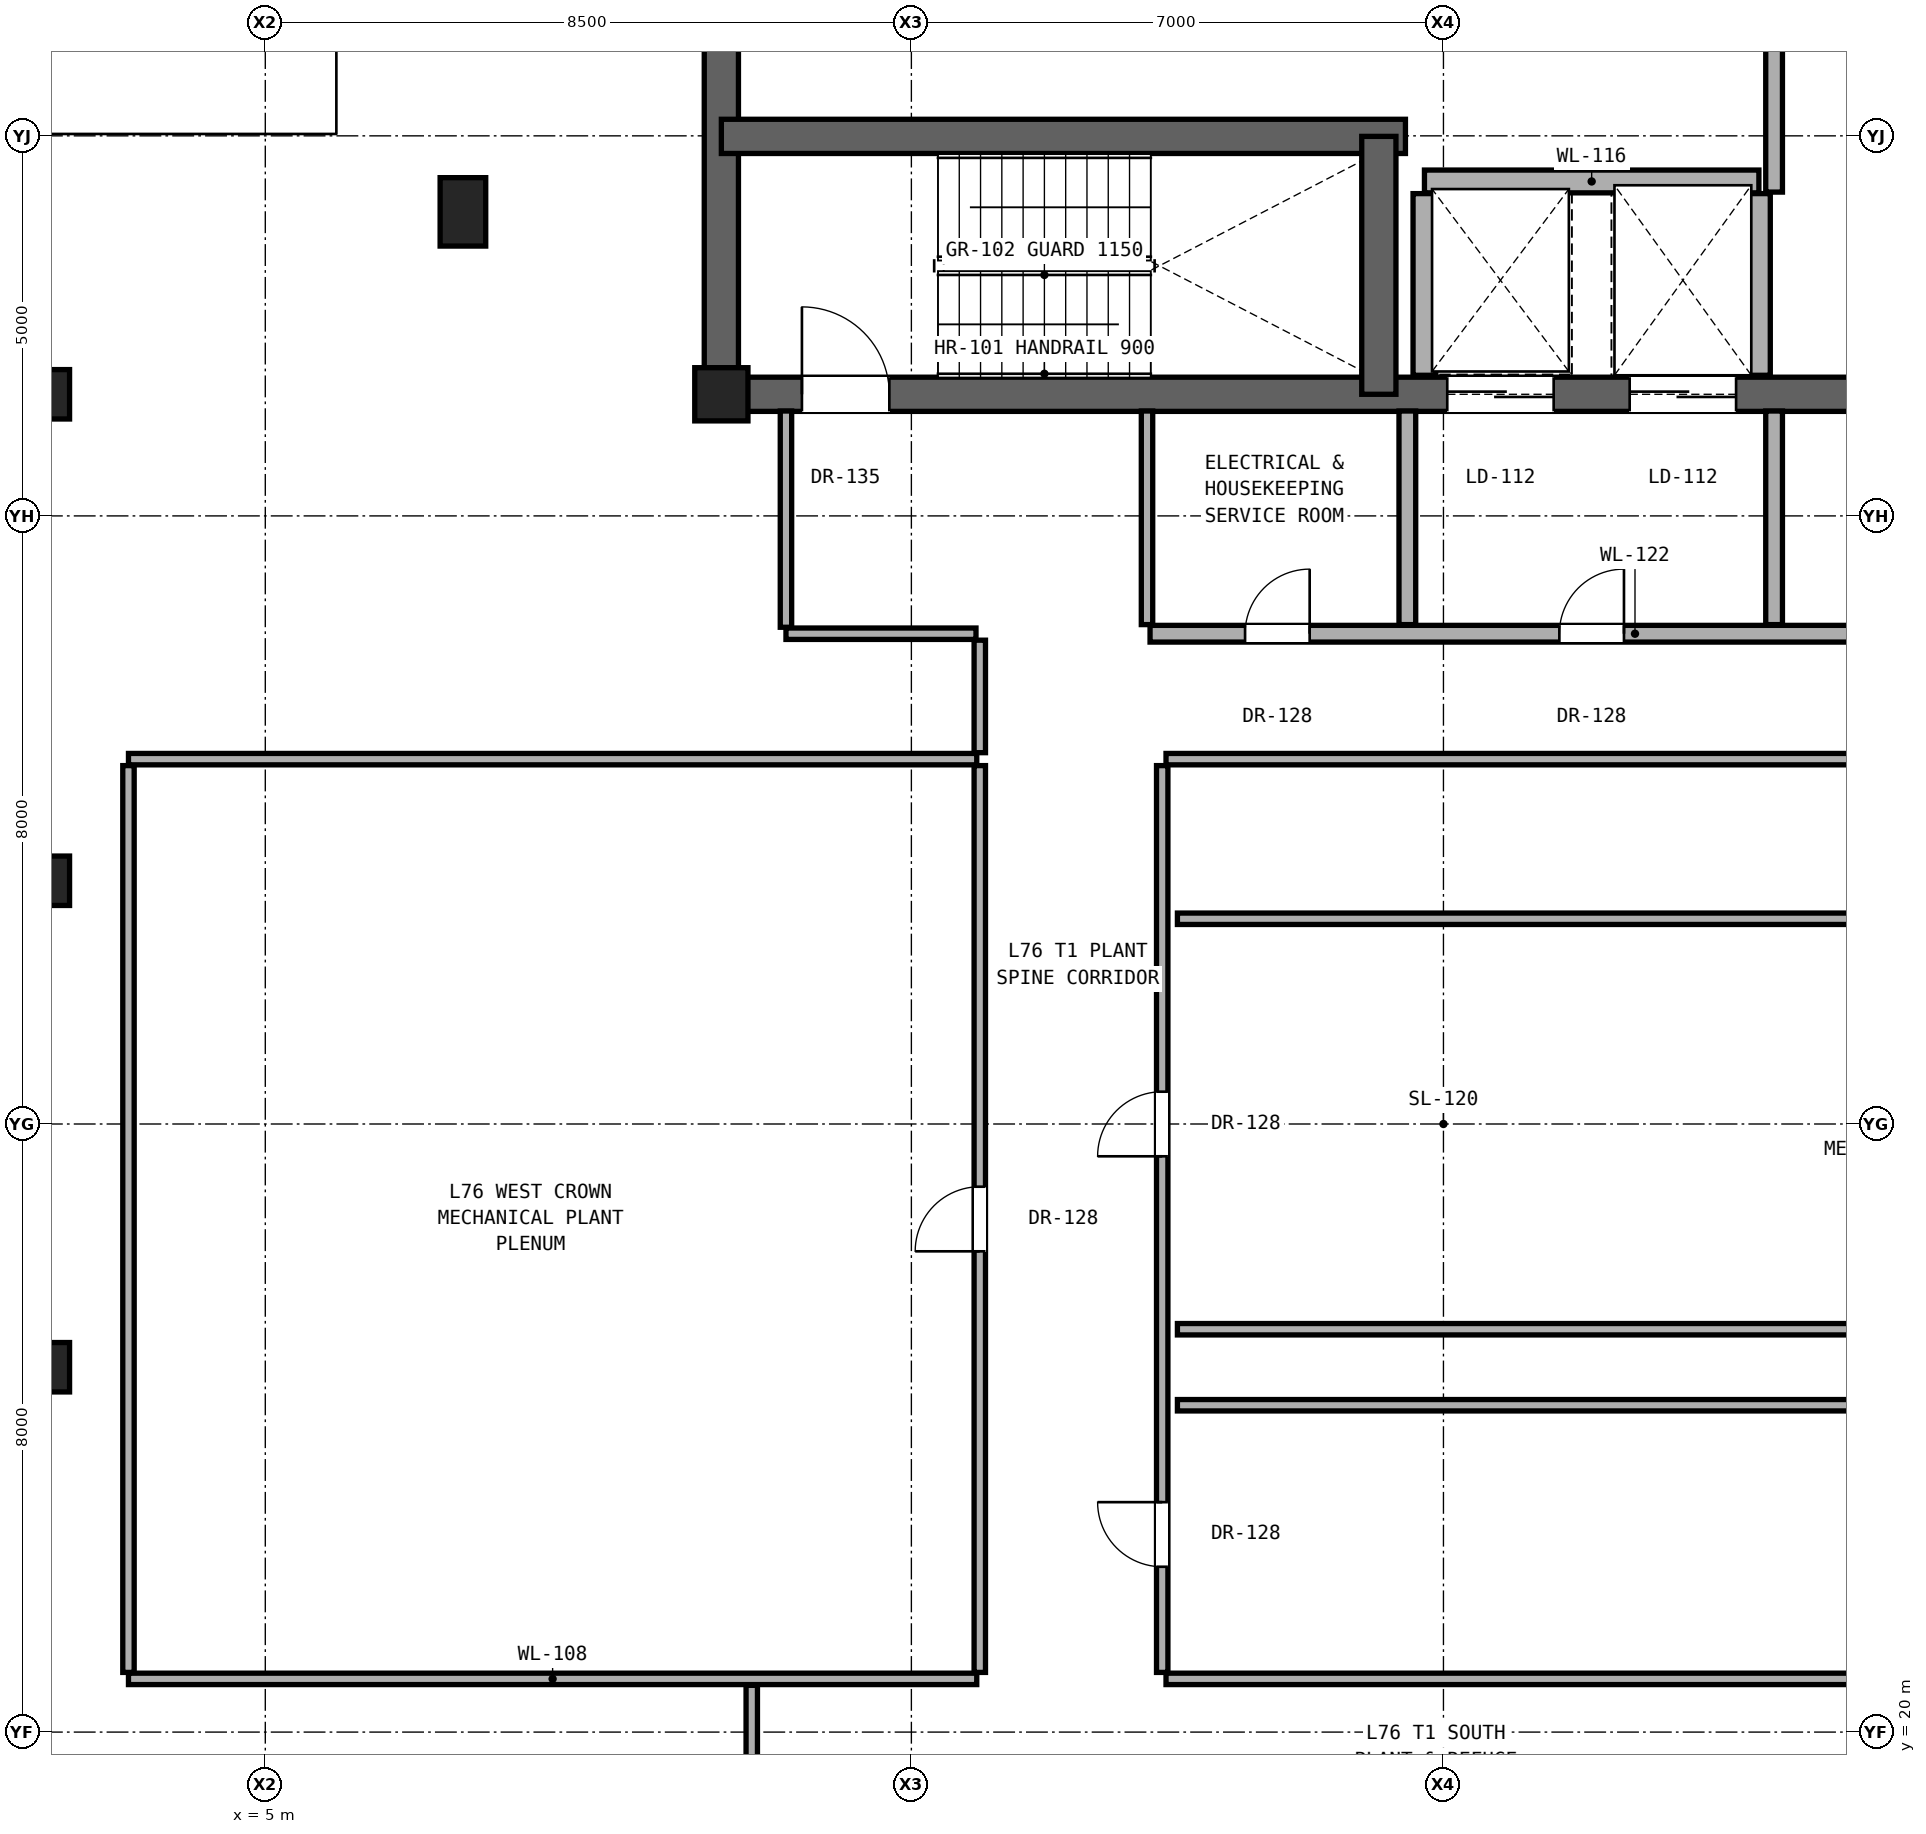
"""IFC4 building model, lengths in metres.
Left out: names, types, materials, properties, quantities, classifications, styles, units other than length and angle.
Written with IfcOpenShell. Run it as: python <this file> out.ifc"""

import sys

from ifc_helpers import new_model, si_unit, direction, frame, frame_2d, origin, origin_2d, place, context, subcontext, project, spatial, rectangle, hollow_rectangle, extrude, element, fill, save


model = new_model("IFC4")
c1 = context("Model", 3, precision=1e-05, world=origin(), true_north=direction((0.0, 1.0)))
c2 = subcontext(c1, "Body", "Model", "MODEL_VIEW")
j1 = project(units=[si_unit("LENGTHUNIT", "METRE"), si_unit("PLANEANGLEUNIT", "RADIAN")], contexts=[c1])
p1 = place(None, origin())
s1 = spatial("IfcSite", under=j1, at=p1, CompositionType="ELEMENT")
p2 = place(p1, origin())
s2 = spatial("IfcBuilding", under=s1, at=p2, CompositionType="ELEMENT")
p3 = place(p2, frame((0.0, 0.0, 266.1)))
s3 = spatial("IfcBuildingStorey", under=s2, at=p3, CompositionType="ELEMENT", Elevation=266.1)
p4 = place(p3, frame((11.0, 37.6, 0.0), z_axis=(0.0, 0.0, 1.0), x_axis=(1.0, 0.0, 0.0)))
e1 = element("IfcColumn", 1, at=p4, inside=s3, PredefinedType="COLUMN", context=c2, shape_type="SweptSolid", body=[
    extrude(rectangle(XDim=0.7, YDim=0.7, at=origin_2d()), origin(), (0.0, 0.0, 1.0), 2.6),
])
for number, where, z_axis, x_axis in (
    (2, (2.1, 24.8, 0.0), (0.0, 0.0, 1.0), (1.0, 0.0, 0.0)),
    (3, (2.1, 31.2, 0.0), (0.0, 0.0, 1.0), (1.0, 0.0, 0.0)),
    (4, (2.1, 37.6, 0.0), (0.0, 0.0, 1.0), (1.0, 0.0, 0.0)),
):
    element("IfcColumn", number, at=place(p3, frame(where, z_axis=z_axis, x_axis=x_axis)), inside=s3, PredefinedType="COLUMN", context=c2, shape_type="SweptSolid", body=[
        extrude(hollow_rectangle(XDim=0.65, YDim=0.65, WallThickness=0.036, at=origin_2d()), origin(), (0.0, 0.0, 1.0), 2.6),
    ])
p5 = place(p3, frame((7.6, 40.0, 0.0), z_axis=(0.0, 0.0, 1.0), x_axis=(1.0, 0.0, 0.0)))
e5 = element("IfcColumn", 5, at=p5, inside=s3, PredefinedType="PILASTER", context=c2, shape_type="SweptSolid", body=[
    extrude(rectangle(XDim=0.6, YDim=0.9, at=origin_2d()), origin(), (0.0, 0.0, 1.0), 2.6),
])
p6 = place(p3, frame((11.0, 37.6, 0.0), z_axis=(0.0, 0.0, 1.0), x_axis=(0.0, 1.0, 0.0)))
e6 = element("IfcWall", 6, at=p6, inside=s3, PredefinedType="SHEAR", context=c2, shape_type="SweptSolid", body=[
    extrude(rectangle(XDim=6.0, YDim=0.45, at=frame_2d((3.0, 0.0))), origin(), (0.0, 0.0, 1.0), 2.38),
])
p7 = place(p3, frame((11.0, 37.6, 0.0), z_axis=(0.0, 0.0, 1.0), x_axis=(1.0, 0.0, 0.0)))
e7 = element("IfcWall", 7, at=p7, inside=s3, PredefinedType="SHEAR", context=c2, shape_type="SweptSolid", body=[
    extrude(rectangle(XDim=19.0, YDim=0.45, at=frame_2d((9.5, 0.0))), origin(), (0.0, 0.0, 1.0), 2.38),
])
p8 = place(p7, frame((1.06, 0.0, 0.0)))
e8 = element("IfcOpeningElement", 8, at=p8, cuts=e7, PredefinedType="OPENING", context=c2, shape_type="SweptSolid", body=[
    extrude(rectangle(XDim=1.15, YDim=2.2, at=frame_2d((0.575, 1.1))), frame((0.0, 0.235, 0.0), z_axis=(0.0, -1.0, 0.0), x_axis=(1.0, 0.0, 0.0)), (0.0, 0.0, 1.0), 0.47),
])
p9 = place(p7, frame((9.55, 0.0, 0.0)))
e9 = element("IfcOpeningElement", 9, at=p9, cuts=e7, PredefinedType="OPENING", context=c2, shape_type="SweptSolid", body=[
    extrude(rectangle(XDim=1.4, YDim=2.35, at=frame_2d((0.7, 1.175))), frame((0.0, 0.235, 0.0), z_axis=(0.0, -1.0, 0.0), x_axis=(1.0, 0.0, 0.0)), (0.0, 0.0, 1.0), 0.47),
])
p10 = place(p7, frame((11.95, 0.0, 0.0)))
e10 = element("IfcOpeningElement", 10, at=p10, cuts=e7, PredefinedType="OPENING", context=c2, shape_type="SweptSolid", body=[
    extrude(rectangle(XDim=1.4, YDim=2.35, at=frame_2d((0.7, 1.175))), frame((0.0, 0.235, 0.0), z_axis=(0.0, -1.0, 0.0), x_axis=(1.0, 0.0, 0.0)), (0.0, 0.0, 1.0), 0.47),
])
p11 = place(p3, frame((11.0, 40.993, 0.0), z_axis=(0.0, 0.0, 1.0), x_axis=(1.0, 0.0, 0.0)))
e11 = element("IfcWall", 11, at=p11, inside=s3, PredefinedType="SHEAR", context=c2, shape_type="SweptSolid", body=[
    extrude(rectangle(XDim=9.0, YDim=0.45, at=frame_2d((4.5, 0.0))), origin(), (0.0, 0.0, 1.0), 2.38),
])
p12 = place(p3, frame((19.65, 37.6, 0.0), z_axis=(0.0, 0.0, 1.0), x_axis=(0.0, 1.0, 0.0)))
e12 = element("IfcWall", 12, at=p12, inside=s3, PredefinedType="SHEAR", context=c2, shape_type="SweptSolid", body=[
    extrude(rectangle(XDim=3.393, YDim=0.45, at=frame_2d((1.696, 0.0))), origin(), (0.0, 0.0, 1.0), 2.38),
])
p13 = place(p3, frame((3.2, 20.7, 0.0), z_axis=(0.0, 0.0, 1.0), x_axis=(1.0, 0.0, 0.0)))
e13 = element("IfcWall", 13, at=p13, inside=s3, PredefinedType="PARTITIONING", context=c2, shape_type="SweptSolid", body=[
    extrude(rectangle(XDim=11.16, YDim=0.15, at=frame_2d((5.58, 0.0))), origin(), (0.0, 0.0, 1.0), 2.042),
])
p14 = place(p3, frame((16.85, 20.7, 0.0), z_axis=(0.0, 0.0, 1.0), x_axis=(1.0, 0.0, 0.0)))
e14 = element("IfcWall", 14, at=p14, inside=s3, PredefinedType="PARTITIONING", context=c2, shape_type="SweptSolid", body=[
    extrude(rectangle(XDim=12.55, YDim=0.15, at=frame_2d((6.275, 0.0))), origin(), (0.0, 0.0, 1.0), 2.042),
])
for number, where, z_axis, x_axis in (
    (15, (17.0, 24.3, 0.0), (0.0, 0.0, 1.0), (1.0, 0.0, 0.0)),
    (16, (17.0, 25.3, 0.0), (0.0, 0.0, 1.0), (1.0, 0.0, 0.0)),
    (17, (17.0, 30.7, 0.0), (0.0, 0.0, 1.0), (1.0, 0.0, 0.0)),
):
    element("IfcWall", number, at=place(p3, frame(where, z_axis=z_axis, x_axis=x_axis)), inside=s3, PredefinedType="PARTITIONING", context=c2, shape_type="SweptSolid", body=[
        extrude(rectangle(XDim=19.8, YDim=0.15, at=frame_2d((9.9, 0.0))), origin(), (0.0, 0.0, 1.0), 2.042),
    ])
p15 = place(p3, frame((3.2, 32.8, 0.0), z_axis=(0.0, 0.0, 1.0), x_axis=(1.0, 0.0, 0.0)))
e18 = element("IfcWall", 18, at=p15, inside=s3, PredefinedType="PARTITIONING", context=c2, shape_type="SweptSolid", body=[
    extrude(rectangle(XDim=11.16, YDim=0.15, at=frame_2d((5.58, 0.0))), origin(), (0.0, 0.0, 1.0), 2.042),
])
p16 = place(p3, frame((16.85, 32.8, 0.0), z_axis=(0.0, 0.0, 1.0), x_axis=(1.0, 0.0, 0.0)))
e19 = element("IfcWall", 19, at=p16, inside=s3, PredefinedType="PARTITIONING", context=c2, shape_type="SweptSolid", body=[
    extrude(rectangle(XDim=12.55, YDim=0.15, at=frame_2d((6.275, 0.0))), origin(), (0.0, 0.0, 1.0), 2.042),
])
p17 = place(p3, frame((11.85, 34.45, 0.0), z_axis=(0.0, 0.0, 1.0), x_axis=(1.0, 0.0, 0.0)))
e20 = element("IfcWall", 20, at=p17, inside=s3, PredefinedType="PARTITIONING", context=c2, shape_type="SweptSolid", body=[
    extrude(rectangle(XDim=2.5, YDim=0.15, at=frame_2d((1.25, 0.0))), origin(), (0.0, 0.0, 1.0), 2.38),
])
p18 = place(p3, frame((16.64, 34.45, 0.0), z_axis=(0.0, 0.0, 1.0), x_axis=(1.0, 0.0, 0.0)))
e21 = element("IfcWall", 21, at=p18, inside=s3, PredefinedType="SOLIDWALL", context=c2, shape_type="SweptSolid", body=[
    extrude(rectangle(XDim=12.76, YDim=0.22, at=frame_2d((6.38, 0.0))), origin(), (0.0, 0.0, 1.0), 2.042),
])
p19 = place(p18, frame((5.385, 0.0, 0.0)))
e22 = element("IfcOpeningElement", 22, at=p19, cuts=e21, PredefinedType="OPENING", context=c2, shape_type="SweptSolid", body=[
    extrude(rectangle(XDim=0.85, YDim=2.01, at=frame_2d((0.425, 1.005))), frame((0.0, 0.12, 0.0), z_axis=(0.0, -1.0, 0.0), x_axis=(1.0, 0.0, 0.0)), (0.0, 0.0, 1.0), 0.24),
])
p20 = place(p18, frame((10.065, 0.0, 0.0)))
e23 = element("IfcOpeningElement", 23, at=p20, cuts=e21, PredefinedType="OPENING", context=c2, shape_type="SweptSolid", body=[
    extrude(rectangle(XDim=0.85, YDim=2.01, at=frame_2d((0.425, 1.005))), frame((0.0, 0.12, 0.0), z_axis=(0.0, -1.0, 0.0), x_axis=(1.0, 0.0, 0.0)), (0.0, 0.0, 1.0), 0.24),
])
p21 = place(p18, frame((1.25, 0.0, 0.0)))
e24 = element("IfcOpeningElement", 24, at=p21, cuts=e21, PredefinedType="OPENING", context=c2, shape_type="SweptSolid", body=[
    extrude(rectangle(XDim=0.85, YDim=2.01, at=frame_2d((0.425, 1.005))), frame((0.0, 0.12, 0.0), z_axis=(0.0, -1.0, 0.0), x_axis=(1.0, 0.0, 0.0)), (0.0, 0.0, 1.0), 0.24),
])
p22 = place(p3, frame((20.25, 40.4, 0.0), z_axis=(0.0, 0.0, 1.0), x_axis=(1.0, 0.0, 0.0)))
e25 = element("IfcWall", 25, at=p22, inside=s3, PredefinedType="SOLIDWALL", context=c2, shape_type="SweptSolid", body=[
    extrude(rectangle(XDim=4.4, YDim=0.3, at=frame_2d((2.2, 0.0))), origin(), (0.0, 0.0, 1.0), 2.38),
])
p23 = place(p3, frame((3.2, 20.785, 0.0), z_axis=(0.0, 0.0, 1.0), x_axis=(0.0, 1.0, 0.0)))
e26 = element("IfcWall", 26, at=p23, inside=s3, PredefinedType="PARTITIONING", context=c2, shape_type="SweptSolid", body=[
    extrude(rectangle(XDim=11.93, YDim=0.15, at=frame_2d((5.965, 0.0))), origin(), (0.0, 0.0, 1.0), 2.042),
])
p24 = place(p3, frame((11.4, 18.62, 0.0), z_axis=(0.0, 0.0, 1.0), x_axis=(0.0, 1.0, 0.0)))
e27 = element("IfcWall", 27, at=p24, inside=s3, PredefinedType="PARTITIONING", context=c2, shape_type="SweptSolid", body=[
    extrude(rectangle(XDim=1.995, YDim=0.15, at=frame_2d((0.998, 0.0))), origin(), (0.0, 0.0, 1.0), 2.38),
])
p25 = place(p3, frame((11.85, 34.535, 0.0), z_axis=(0.0, 0.0, 1.0), x_axis=(0.0, 1.0, 0.0)))
e28 = element("IfcWall", 28, at=p25, inside=s3, PredefinedType="PARTITIONING", context=c2, shape_type="SweptSolid", body=[
    extrude(rectangle(XDim=2.845, YDim=0.15, at=frame_2d((1.422, 0.0))), origin(), (0.0, 0.0, 1.0), 2.38),
])
p26 = place(p3, frame((14.4, 20.785, 0.0), z_axis=(0.0, 0.0, 1.0), x_axis=(0.0, 1.0, 0.0)))
e29 = element("IfcWall", 29, at=p26, inside=s3, PredefinedType="PARTITIONING", context=c2, shape_type="SweptSolid", body=[
    extrude(rectangle(XDim=11.93, YDim=0.15, at=frame_2d((5.965, 0.0))), origin(), (0.0, 0.0, 1.0), 2.042),
])
p27 = place(p26, frame((5.54, 0.0, 0.0)))
e30 = element("IfcOpeningElement", 30, at=p27, cuts=e29, PredefinedType="OPENING", context=c2, shape_type="SweptSolid", body=[
    extrude(rectangle(XDim=0.85, YDim=2.01, at=frame_2d((0.425, 1.005))), frame((0.0, 0.085, 0.0), z_axis=(0.0, -1.0, 0.0), x_axis=(1.0, 0.0, 0.0)), (0.0, 0.0, 1.0), 0.17),
])
p28 = place(p3, frame((14.4, 32.885, 0.0), z_axis=(0.0, 0.0, 1.0), x_axis=(0.0, 1.0, 0.0)))
e31 = element("IfcWall", 31, at=p28, inside=s3, PredefinedType="PARTITIONING", context=c2, shape_type="SweptSolid", body=[
    extrude(rectangle(XDim=1.48, YDim=0.15, at=frame_2d((0.74, 0.0))), origin(), (0.0, 0.0, 1.0), 2.38),
])
p29 = place(p3, frame((16.6, 34.57, 0.0), z_axis=(0.0, 0.0, 1.0), x_axis=(0.0, 1.0, 0.0)))
e32 = element("IfcWall", 32, at=p29, inside=s3, PredefinedType="PARTITIONING", context=c2, shape_type="SweptSolid", body=[
    extrude(rectangle(XDim=2.81, YDim=0.15, at=frame_2d((1.405, 0.0))), origin(), (0.0, 0.0, 1.0), 2.38),
])
p30 = place(p3, frame((16.8, 20.785, 0.0), z_axis=(0.0, 0.0, 1.0), x_axis=(0.0, 1.0, 0.0)))
e33 = element("IfcWall", 33, at=p30, inside=s3, PredefinedType="PARTITIONING", context=c2, shape_type="SweptSolid", body=[
    extrude(rectangle(XDim=11.93, YDim=0.15, at=frame_2d((5.965, 0.0))), origin(), (0.0, 0.0, 1.0), 2.042),
])
p31 = place(p30, frame((6.79, 0.0, 0.0)))
e34 = element("IfcOpeningElement", 34, at=p31, cuts=e33, PredefinedType="OPENING", context=c2, shape_type="SweptSolid", body=[
    extrude(rectangle(XDim=0.85, YDim=2.01, at=frame_2d((0.425, 1.005))), frame((0.0, 0.085, 0.0), z_axis=(0.0, -1.0, 0.0), x_axis=(1.0, 0.0, 0.0)), (0.0, 0.0, 1.0), 0.17),
])
p32 = place(p30, frame((1.39, 0.0, 0.0)))
e35 = element("IfcOpeningElement", 35, at=p32, cuts=e33, PredefinedType="OPENING", context=c2, shape_type="SweptSolid", body=[
    extrude(rectangle(XDim=0.85, YDim=2.01, at=frame_2d((0.425, 1.005))), frame((0.0, 0.085, 0.0), z_axis=(0.0, -1.0, 0.0), x_axis=(1.0, 0.0, 0.0)), (0.0, 0.0, 1.0), 0.17),
])
p33 = place(p3, frame((20.025, 34.57, 0.0), z_axis=(0.0, 0.0, 1.0), x_axis=(0.0, 1.0, 0.0)))
e36 = element("IfcWall", 36, at=p33, inside=s3, PredefinedType="SOLIDWALL", context=c2, shape_type="SweptSolid", body=[
    extrude(rectangle(XDim=2.81, YDim=0.22, at=frame_2d((1.405, 0.0))), origin(), (0.0, 0.0, 1.0), 2.38),
])
for number, where, z_axis, x_axis in (
    (37, (20.25, 37.85, 0.0), (0.0, 0.0, 1.0), (0.0, 1.0, 0.0)),
    (38, (24.65, 37.85, 0.0), (0.0, 0.0, 1.0), (0.0, 1.0, 0.0)),
):
    element("IfcWall", number, at=place(p3, frame(where, z_axis=z_axis, x_axis=x_axis)), inside=s3, PredefinedType="SOLIDWALL", context=c2, shape_type="SweptSolid", body=[
        extrude(rectangle(XDim=2.39, YDim=0.3, at=frame_2d((1.195, 0.0))), origin(), (0.0, 0.0, 1.0), 2.38),
    ])
p34 = place(p3, frame((24.85, 34.57, 0.0), z_axis=(0.0, 0.0, 1.0), x_axis=(0.0, 1.0, 0.0)))
e39 = element("IfcWall", 39, at=p34, inside=s3, PredefinedType="SOLIDWALL", context=c2, shape_type="SweptSolid", body=[
    extrude(rectangle(XDim=2.81, YDim=0.22, at=frame_2d((1.405, 0.0))), origin(), (0.0, 0.0, 1.0), 2.38),
])
p35 = place(p3, frame((24.85, 40.26, 0.0), z_axis=(0.0, 0.0, 1.0), x_axis=(0.0, 1.0, 0.0)))
e40 = element("IfcWall", 40, at=p35, inside=s3, PredefinedType="SOLIDWALL", context=c2, shape_type="SweptSolid", body=[
    extrude(rectangle(XDim=2.855, YDim=0.22, at=frame_2d((1.427, 0.0))), origin(), (0.0, 0.0, 1.0), 2.38),
])
p36 = place(p8, origin())
e41 = element("IfcDoor", 41, at=p36, inside=s3, OperationType="SINGLE_SWING_LEFT", PredefinedType="DOOR", context=c2, shape_type="SweptSolid", body=[
    extrude(rectangle(XDim=1.15, YDim=2.2, at=frame_2d((0.575, 1.1))), frame((0.0, 0.025, 0.0), z_axis=(0.0, -1.0, 0.0), x_axis=(1.0, 0.0, 0.0)), (0.0, 0.0, 1.0), 0.05),
])
fill(e8, e41)
p37 = place(p19, origin())
e42 = element("IfcDoor", 42, at=p37, inside=s3, OperationType="SINGLE_SWING_RIGHT", PredefinedType="DOOR", context=c2, shape_type="SweptSolid", body=[
    extrude(rectangle(XDim=0.85, YDim=2.01, at=frame_2d((0.425, 1.005))), frame((0.0, 0.025, 0.0), z_axis=(0.0, -1.0, 0.0), x_axis=(1.0, 0.0, 0.0)), (0.0, 0.0, 1.0), 0.05),
])
fill(e22, e42)
p38 = place(p21, origin())
e43 = element("IfcDoor", 43, at=p38, inside=s3, OperationType="SINGLE_SWING_RIGHT", PredefinedType="DOOR", context=c2, shape_type="SweptSolid", body=[
    extrude(rectangle(XDim=0.85, YDim=2.01, at=frame_2d((0.425, 1.005))), frame((0.0, 0.025, 0.0), z_axis=(0.0, -1.0, 0.0), x_axis=(1.0, 0.0, 0.0)), (0.0, 0.0, 1.0), 0.05),
])
fill(e24, e43)
p39 = place(p31, origin())
e44 = element("IfcDoor", 44, at=p39, inside=s3, OperationType="SINGLE_SWING_LEFT", PredefinedType="DOOR", context=c2, shape_type="SweptSolid", body=[
    extrude(rectangle(XDim=0.85, YDim=2.01, at=frame_2d((0.425, 1.005))), frame((0.0, 0.025, 0.0), z_axis=(0.0, -1.0, 0.0), x_axis=(1.0, 0.0, 0.0)), (0.0, 0.0, 1.0), 0.05),
])
fill(e34, e44)
p40 = place(p32, origin())
e45 = element("IfcDoor", 45, at=p40, inside=s3, OperationType="SINGLE_SWING_RIGHT", PredefinedType="DOOR", context=c2, shape_type="SweptSolid", body=[
    extrude(rectangle(XDim=0.85, YDim=2.01, at=frame_2d((0.425, 1.005))), frame((0.0, 0.025, 0.0), z_axis=(0.0, -1.0, 0.0), x_axis=(1.0, 0.0, 0.0)), (0.0, 0.0, 1.0), 0.05),
])
fill(e35, e45)
p41 = place(p27, origin())
e46 = element("IfcDoor", 46, at=p41, inside=s3, OperationType="SINGLE_SWING_LEFT", PredefinedType="DOOR", context=c2, shape_type="SweptSolid", body=[
    extrude(rectangle(XDim=0.85, YDim=2.01, at=frame_2d((0.425, 1.005))), frame((0.0, 0.025, 0.0), z_axis=(0.0, -1.0, 0.0), x_axis=(1.0, 0.0, 0.0)), (0.0, 0.0, 1.0), 0.05),
])
fill(e30, e46)
p42 = place(p9, origin())
e47 = element("IfcDoor", 47, at=p42, inside=s3, OperationType="DOUBLE_DOOR_SLIDING", PredefinedType="DOOR", context=c2, shape_type="SweptSolid", body=[
    extrude(rectangle(XDim=1.4, YDim=2.35, at=frame_2d((0.7, 1.175))), frame((0.0, 0.025, 0.0), z_axis=(0.0, -1.0, 0.0), x_axis=(1.0, 0.0, 0.0)), (0.0, 0.0, 1.0), 0.05),
])
fill(e9, e47)
p43 = place(p10, origin())
e48 = element("IfcDoor", 48, at=p43, inside=s3, OperationType="DOUBLE_DOOR_SLIDING", PredefinedType="DOOR", context=c2, shape_type="SweptSolid", body=[
    extrude(rectangle(XDim=1.4, YDim=2.35, at=frame_2d((0.7, 1.175))), frame((0.0, 0.025, 0.0), z_axis=(0.0, -1.0, 0.0), x_axis=(1.0, 0.0, 0.0)), (0.0, 0.0, 1.0), 0.05),
])
fill(e10, e48)
save(model, sys.argv[1])
